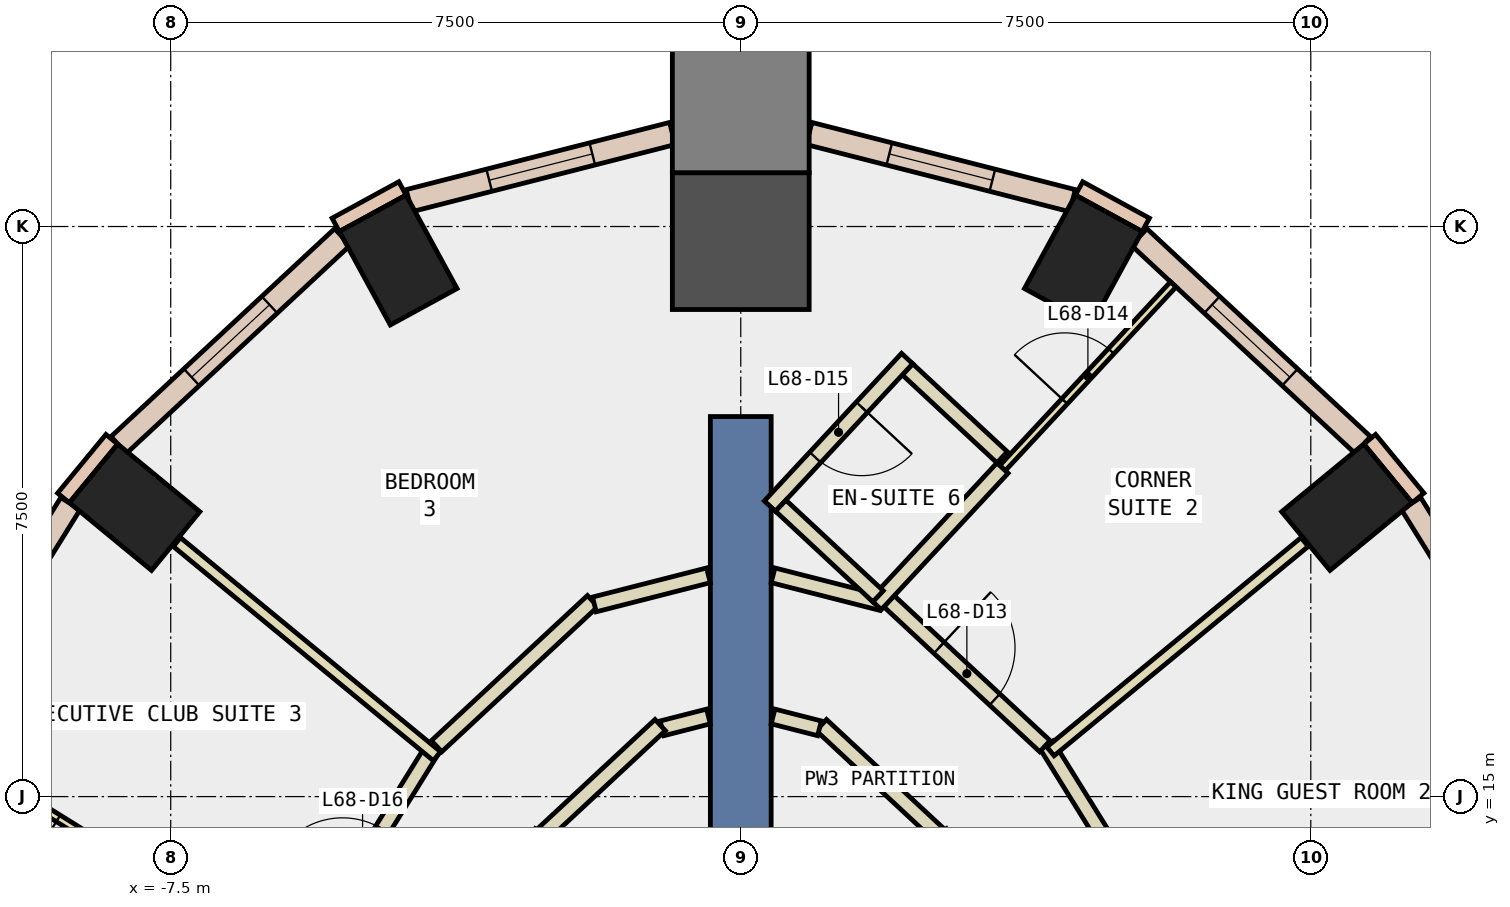
"""IFC4 building model, lengths in metres.
Left out: names, types, materials, properties, quantities, classifications, styles, units other than length and angle.
Written with IfcOpenShell. Run it as: python <this file> out.ifc"""

import sys

from ifc_helpers import new_model, si_unit, direction, frame, frame_2d, origin, origin_2d, place, context, subcontext, project, spatial, rectangle, extrude, element, fill, save


model = new_model("IFC4")
c1 = context("Model", 3, precision=1e-05, world=origin(), true_north=direction((0.0, 1.0)))
c2 = subcontext(c1, "Body", "Model", "MODEL_VIEW")
j1 = project(units=[si_unit("LENGTHUNIT", "METRE"), si_unit("PLANEANGLEUNIT", "RADIAN")], contexts=[c1])
p1 = place(None, origin())
s1 = spatial("IfcSite", under=j1, at=p1, CompositionType="ELEMENT")
p2 = place(p1, origin())
s2 = spatial("IfcBuilding", under=s1, at=p2, CompositionType="ELEMENT")
p3 = place(p2, frame((0.0, 0.0, 293.6)))
s3 = spatial("IfcBuildingStorey", under=s2, at=p3, CompositionType="ELEMENT", Elevation=293.6)
for number, where, z_axis, x_axis in (
    (1, (7.975, 18.807, -0.34), (0.0, 0.0, 1.0), (-0.636, 0.772, 0.0)),
    (2, (4.507, 22.059, -0.34), (0.0, 0.0, 1.0), (-0.878, 0.479, 0.0)),
):
    element("IfcColumn", number, at=place(p3, frame(where, z_axis=z_axis, x_axis=x_axis)), inside=s3, PredefinedType="COLUMN", context=c2, shape_type="SweptSolid", body=[
        extrude(rectangle(XDim=1.0, YDim=1.4, at=origin_2d()), origin(), (0.0, 0.0, 1.0), 3.6),
    ])
p4 = place(p3, frame((0.0, 22.308, -0.34), z_axis=(0.0, 0.0, 1.0), x_axis=(0.0, 1.0, 0.0)))
e3 = element("IfcColumn", 3, at=p4, inside=s3, PredefinedType="COLUMN", context=c2, shape_type="SweptSolid", body=[
    extrude(rectangle(XDim=1.8, YDim=1.8, at=origin_2d()), origin(), (0.0, 0.0, 1.0), 3.6),
])
for number, where, z_axis, x_axis in (
    (4, (-4.507, 22.059, -0.34), (0.0, 0.0, 1.0), (0.878, 0.479, 0.0)),
    (5, (-7.975, 18.807, -0.34), (0.0, 0.0, 1.0), (0.636, 0.772, 0.0)),
):
    element("IfcColumn", number, at=place(p3, frame(where, z_axis=z_axis, x_axis=x_axis)), inside=s3, PredefinedType="COLUMN", context=c2, shape_type="SweptSolid", body=[
        extrude(rectangle(XDim=1.0, YDim=1.4, at=origin_2d()), origin(), (0.0, 0.0, 1.0), 3.6),
    ])
p5 = place(p3, frame((0.0, 24.108, -0.34), z_axis=(0.0, 0.0, 1.0), x_axis=(0.0, 1.0, 0.0)))
e6 = element("IfcColumn", 6, at=p5, inside=s3, PredefinedType="COLUMN", context=c2, shape_type="SweptSolid", body=[
    extrude(rectangle(XDim=1.8, YDim=1.8, at=origin_2d()), origin(), (0.0, 0.0, 1.0), 3.6),
])
p6 = place(p3, frame((0.0, 11.0, -0.34), z_axis=(0.0, 0.0, 1.0), x_axis=(0.0, 1.0, 0.0)))
e7 = element("IfcWall", 7, at=p6, inside=s3, PredefinedType="SHEAR", context=c2, shape_type="SweptSolid", body=[
    extrude(rectangle(XDim=9.0, YDim=0.8, at=frame_2d((4.5, 0.0))), origin(), (0.0, 0.0, 1.0), 3.6),
])
for number, where, z_axis, x_axis in (
    (8, (5.329, 22.522, 0.0), (0.0, 0.0, 1.0), (-0.878, 0.479, 0.0)),
    (9, (-4.451, 23.001, 0.0), (0.0, 0.0, 1.0), (-0.878, -0.479, 0.0)),
    (10, (8.911, 18.929, 0.0), (0.0, 0.0, 1.0), (-0.636, 0.772, 0.0)),
    (11, (-8.275, 19.701, 0.0), (0.0, 0.0, 1.0), (-0.636, -0.772, 0.0)),
):
    element("IfcWall", number, at=place(p3, frame(where, z_axis=z_axis, x_axis=x_axis)), inside=s3, PredefinedType="STANDARD", context=c2, shape_type="SweptSolid", body=[
        extrude(rectangle(XDim=1.0, YDim=0.2, at=frame_2d((0.5, 0.0))), origin(), (0.0, 0.0, 1.0), 3.26),
    ])
p7 = place(p3, frame((12.659, 12.675, 0.0), z_axis=(0.0, 0.0, 1.0), x_axis=(-0.527762071678, 0.849392250788, 0.0)))
e12 = element("IfcWall", 12, at=p7, inside=s3, PredefinedType="STANDARD", context=c2, shape_type="SweptSolid", body=[
    extrude(rectangle(XDim=7.276, YDim=0.3, at=frame_2d((3.638, 0.0))), origin(), (0.0, 0.0, 1.0), 3.26),
])
p8 = place(p7, frame((0.719, 0.0, 0.9)))
e13 = element("IfcOpeningElement", 13, at=p8, cuts=e12, PredefinedType="OPENING", context=c2, shape_type="SweptSolid", body=[
    extrude(rectangle(XDim=2.2, YDim=2.0, at=frame_2d((1.1, 1.0))), frame((0.0, 0.16, 0.0), z_axis=(0.0, -1.0, 0.0), x_axis=(1.0, 0.0, 0.0)), (0.0, 0.0, 1.0), 0.32),
])
p9 = place(p7, frame((4.357, 0.0, 0.9)))
e14 = element("IfcOpeningElement", 14, at=p9, cuts=e12, PredefinedType="OPENING", context=c2, shape_type="SweptSolid", body=[
    extrude(rectangle(XDim=2.2, YDim=2.0, at=frame_2d((1.1, 1.0))), frame((0.0, 0.16, 0.0), z_axis=(0.0, -1.0, 0.0), x_axis=(1.0, 0.0, 0.0)), (0.0, 0.0, 1.0), 0.32),
])
p10 = place(p3, frame((8.184, 19.626, 0.0), z_axis=(0.0, 0.0, 1.0), x_axis=(-0.732397380344, 0.680877431896, 0.0)))
e15 = element("IfcWall", 15, at=p10, inside=s3, PredefinedType="STANDARD", context=c2, shape_type="SweptSolid", body=[
    extrude(rectangle(XDim=4.019, YDim=0.3, at=frame_2d((2.009, 0.0))), origin(), (0.0, 0.0, 1.0), 3.26),
])
p11 = place(p10, frame((1.309, 0.0, 0.9)))
e16 = element("IfcOpeningElement", 16, at=p11, cuts=e15, PredefinedType="OPENING", context=c2, shape_type="SweptSolid", body=[
    extrude(rectangle(XDim=1.4, YDim=2.0, at=frame_2d((0.7, 1.0))), frame((0.0, 0.16, 0.0), z_axis=(0.0, -1.0, 0.0), x_axis=(1.0, 0.0, 0.0)), (0.0, 0.0, 1.0), 0.32),
])
p12 = place(p3, frame((4.365, 22.84, 0.0), z_axis=(0.0, 0.0, 1.0), x_axis=(-0.968979290476, 0.247141932156, 0.0)))
e17 = element("IfcWall", 17, at=p12, inside=s3, PredefinedType="STANDARD", context=c2, shape_type="SweptSolid", body=[
    extrude(rectangle(XDim=3.577, YDim=0.3, at=frame_2d((1.789, 0.0))), origin(), (0.0, 0.0, 1.0), 3.26),
])
p13 = place(p12, frame((1.088, 0.0, 0.9)))
e18 = element("IfcOpeningElement", 18, at=p13, cuts=e17, PredefinedType="OPENING", context=c2, shape_type="SweptSolid", body=[
    extrude(rectangle(XDim=1.4, YDim=2.0, at=frame_2d((0.7, 1.0))), frame((0.0, 0.16, 0.0), z_axis=(0.0, -1.0, 0.0), x_axis=(1.0, 0.0, 0.0)), (0.0, 0.0, 1.0), 0.32),
])
p14 = place(p3, frame((-0.899, 23.724, 0.0), z_axis=(0.0, 0.0, 1.0), x_axis=(-0.968979290476, -0.247141932156, 0.0)))
e19 = element("IfcWall", 19, at=p14, inside=s3, PredefinedType="STANDARD", context=c2, shape_type="SweptSolid", body=[
    extrude(rectangle(XDim=3.577, YDim=0.3, at=frame_2d((1.789, 0.0))), origin(), (0.0, 0.0, 1.0), 3.26),
])
p15 = place(p14, frame((1.088, 0.0, 0.9)))
e20 = element("IfcOpeningElement", 20, at=p15, cuts=e19, PredefinedType="OPENING", context=c2, shape_type="SweptSolid", body=[
    extrude(rectangle(XDim=1.4, YDim=2.0, at=frame_2d((0.7, 1.0))), frame((0.0, 0.16, 0.0), z_axis=(0.0, -1.0, 0.0), x_axis=(1.0, 0.0, 0.0)), (0.0, 0.0, 1.0), 0.32),
])
p16 = place(p3, frame((-5.241, 22.362, 0.0), z_axis=(0.0, 0.0, 1.0), x_axis=(-0.732397380344, -0.680877431896, 0.0)))
e21 = element("IfcWall", 21, at=p16, inside=s3, PredefinedType="STANDARD", context=c2, shape_type="SweptSolid", body=[
    extrude(rectangle(XDim=4.019, YDim=0.3, at=frame_2d((2.009, 0.0))), origin(), (0.0, 0.0, 1.0), 3.26),
])
p17 = place(p16, frame((1.309, 0.0, 0.9)))
e22 = element("IfcOpeningElement", 22, at=p17, cuts=e21, PredefinedType="OPENING", context=c2, shape_type="SweptSolid", body=[
    extrude(rectangle(XDim=1.4, YDim=2.0, at=frame_2d((0.7, 1.0))), frame((0.0, 0.16, 0.0), z_axis=(0.0, -1.0, 0.0), x_axis=(1.0, 0.0, 0.0)), (0.0, 0.0, 1.0), 0.32),
])
p18 = place(p3, frame((-8.819, 18.855, 0.0), z_axis=(0.0, 0.0, 1.0), x_axis=(-0.527762071678, -0.849392250788, 0.0)))
e23 = element("IfcWall", 23, at=p18, inside=s3, PredefinedType="STANDARD", context=c2, shape_type="SweptSolid", body=[
    extrude(rectangle(XDim=7.276, YDim=0.3, at=frame_2d((3.638, 0.0))), origin(), (0.0, 0.0, 1.0), 3.26),
])
p19 = place(p18, frame((0.719, 0.0, 0.9)))
e24 = element("IfcOpeningElement", 24, at=p19, cuts=e23, PredefinedType="OPENING", context=c2, shape_type="SweptSolid", body=[
    extrude(rectangle(XDim=2.2, YDim=2.0, at=frame_2d((1.1, 1.0))), frame((0.0, 0.16, 0.0), z_axis=(0.0, -1.0, 0.0), x_axis=(1.0, 0.0, 0.0)), (0.0, 0.0, 1.0), 0.32),
])
p20 = place(p18, frame((4.357, 0.0, 0.9)))
e25 = element("IfcOpeningElement", 25, at=p20, cuts=e23, PredefinedType="OPENING", context=c2, shape_type="SweptSolid", body=[
    extrude(rectangle(XDim=2.2, YDim=2.0, at=frame_2d((1.1, 1.0))), frame((0.0, 0.16, 0.0), z_axis=(0.0, -1.0, 0.0), x_axis=(1.0, 0.0, 0.0)), (0.0, 0.0, 1.0), 0.32),
])
p21 = place(p3, frame((2.6, 14.509, 0.0), z_axis=(0.0, 0.0, 1.0), x_axis=(-0.732355024595, 0.680922989735, 0.0)))
e26 = element("IfcWall", 26, at=p21, inside=s3, PredefinedType="PARTITIONING", context=c2, shape_type="SweptSolid", body=[
    extrude(rectangle(XDim=2.103, YDim=0.2, at=frame_2d((1.051, 0.0))), origin(), (0.0, 0.0, 1.0), 3.26),
])
for number, where, z_axis, x_axis in (
    (27, (1.036, 15.898, 0.0), (0.0, 0.0, 1.0), (-0.969, 0.247, 0.0)),
    (28, (-0.425, 16.054, 0.0), (0.0, 0.0, 1.0), (-0.969, -0.247, 0.0)),
):
    element("IfcWall", number, at=place(p3, frame(where, z_axis=z_axis, x_axis=x_axis)), inside=s3, PredefinedType="PARTITIONING", context=c2, shape_type="SweptSolid", body=[
        extrude(rectangle(XDim=0.63, YDim=0.2, at=frame_2d((0.315, 0.0))), origin(), (0.0, 0.0, 1.0), 3.26),
    ])
p22 = place(p3, frame((-1.06, 15.941, 0.0), z_axis=(0.0, 0.0, 1.0), x_axis=(-0.732355024595, -0.680922989735, 0.0)))
e29 = element("IfcWall", 29, at=p22, inside=s3, PredefinedType="PARTITIONING", context=c2, shape_type="SweptSolid", body=[
    extrude(rectangle(XDim=2.103, YDim=0.2, at=frame_2d((1.051, 0.0))), origin(), (0.0, 0.0, 1.0), 3.26),
])
p23 = place(p3, frame((4.022, 15.68, 0.0), z_axis=(0.0, 0.0, 1.0), x_axis=(0.527737948498, -0.849407239029, 0.0)))
e30 = element("IfcWall", 30, at=p23, inside=s3, PredefinedType="PARTITIONING", context=c2, shape_type="SweptSolid", body=[
    extrude(rectangle(XDim=5.217, YDim=0.2, at=frame_2d((2.608, 0.0))), origin(), (0.0, 0.0, 1.0), 3.26),
])
p24 = place(p23, frame((2.159, 0.0, 0.0)))
e31 = element("IfcOpeningElement", 31, at=p24, cuts=e30, PredefinedType="OPENING", context=c2, shape_type="SweptSolid", body=[
    extrude(rectangle(XDim=1.0, YDim=2.1, at=frame_2d((0.5, 1.05))), frame((0.0, 0.11, 0.0), z_axis=(0.0, -1.0, 0.0), x_axis=(1.0, 0.0, 0.0)), (0.0, 0.0, 1.0), 0.22),
])
p25 = place(p3, frame((1.949, 17.572, 0.0), z_axis=(0.0, 0.0, 1.0), x_axis=(0.732331154554, -0.680948661846, 0.0)))
e32 = element("IfcWall", 32, at=p25, inside=s3, PredefinedType="PARTITIONING", context=c2, shape_type="SweptSolid", body=[
    extrude(rectangle(XDim=2.803, YDim=0.2, at=frame_2d((1.402, 0.0))), origin(), (0.0, 0.0, 1.0), 3.26),
])
p26 = place(p25, frame((0.901, 0.0, 0.0)))
e33 = element("IfcOpeningElement", 33, at=p26, cuts=e32, PredefinedType="OPENING", context=c2, shape_type="SweptSolid", body=[
    extrude(rectangle(XDim=1.0, YDim=2.1, at=frame_2d((0.5, 1.05))), frame((0.0, 0.11, 0.0), z_axis=(0.0, -1.0, 0.0), x_axis=(1.0, 0.0, 0.0)), (0.0, 0.0, 1.0), 0.22),
])
p27 = place(p3, frame((-4.002, 15.663, 0.0), z_axis=(0.0, 0.0, 1.0), x_axis=(0.732331154554, 0.680948661846, 0.0)))
e34 = element("IfcWall", 34, at=p27, inside=s3, PredefinedType="PARTITIONING", context=c2, shape_type="SweptSolid", body=[
    extrude(rectangle(XDim=2.803, YDim=0.2, at=frame_2d((1.402, 0.0))), origin(), (0.0, 0.0, 1.0), 3.26),
])
p28 = place(p3, frame((-1.926, 17.528, 0.0), z_axis=(0.0, 0.0, 1.0), x_axis=(0.968981980879, 0.247131383542, 0.0)))
e35 = element("IfcWall", 35, at=p28, inside=s3, PredefinedType="PARTITIONING", context=c2, shape_type="SweptSolid", body=[
    extrude(rectangle(XDim=1.549, YDim=0.2, at=frame_2d((0.774, 0.0))), origin(), (0.0, 0.0, 1.0), 3.26),
])
p29 = place(p3, frame((0.425, 17.911, 0.0), z_axis=(0.0, 0.0, 1.0), x_axis=(0.969051069597, -0.246860334023, 0.0)))
e36 = element("IfcWall", 36, at=p29, inside=s3, PredefinedType="PARTITIONING", context=c2, shape_type="SweptSolid", body=[
    extrude(rectangle(XDim=1.474, YDim=0.2, at=frame_2d((0.737, 0.0))), origin(), (0.0, 0.0, 1.0), 3.26),
])
p30 = place(p3, frame((-5.889, 12.675, 0.0), z_axis=(0.0, 0.0, 1.0), x_axis=(0.527550626699, 0.849523593709, 0.0)))
e37 = element("IfcWall", 37, at=p30, inside=s3, PredefinedType="PARTITIONING", context=c2, shape_type="SweptSolid", body=[
    extrude(rectangle(XDim=3.463, YDim=0.2, at=frame_2d((1.731, 0.0))), origin(), (0.0, 0.0, 1.0), 3.26),
])
p31 = place(p30, frame((1.231, 0.0, 0.0)))
e38 = element("IfcOpeningElement", 38, at=p31, cuts=e37, PredefinedType="OPENING", context=c2, shape_type="SweptSolid", body=[
    extrude(rectangle(XDim=1.0, YDim=2.1, at=frame_2d((0.5, 1.05))), frame((0.0, 0.11, 0.0), z_axis=(0.0, -1.0, 0.0), x_axis=(1.0, 0.0, 0.0)), (0.0, 0.0, 1.0), 0.22),
])
p32 = place(p3, frame((4.075, 15.595, 0.0), z_axis=(0.0, 0.0, 1.0), x_axis=(0.771899326406, 0.635744783616, 0.0)))
e39 = element("IfcWall", 39, at=p32, inside=s3, PredefinedType="PARTITIONING", context=c2, shape_type="SweptSolid", body=[
    extrude(rectangle(XDim=4.332, YDim=0.15, at=frame_2d((2.166, 0.0))), origin(), (0.0, 0.0, 1.0), 3.26),
])
p33 = place(p3, frame((3.444, 19.322, 0.0), z_axis=(0.0, 0.0, 1.0), x_axis=(0.68085394361, 0.732419215662, 0.0)))
e40 = element("IfcWall", 40, at=p33, inside=s3, PredefinedType="PARTITIONING", context=c2, shape_type="SweptSolid", body=[
    extrude(rectangle(XDim=3.3, YDim=0.1, at=frame_2d((1.65, 0.0))), origin(), (0.0, 0.0, 1.0), 3.26),
])
p34 = place(p33, frame((1.2, 0.0, 0.0)))
e41 = element("IfcOpeningElement", 41, at=p34, cuts=e40, PredefinedType="OPENING", context=c2, shape_type="SweptSolid", body=[
    extrude(rectangle(XDim=0.9, YDim=2.1, at=frame_2d((0.45, 1.05))), frame((0.0, 0.06, 0.0), z_axis=(0.0, -1.0, 0.0), x_axis=(1.0, 0.0, 0.0)), (0.0, 0.0, 1.0), 0.12),
])
p35 = place(p3, frame((1.776, 17.528, 0.0), z_axis=(0.0, 0.0, 1.0), x_axis=(0.680978439741, 0.732303464834, 0.0)))
e42 = element("IfcWall", 42, at=p35, inside=s3, PredefinedType="PARTITIONING", context=c2, shape_type="SweptSolid", body=[
    extrude(rectangle(XDim=2.45, YDim=0.2, at=frame_2d((1.225, 0.0))), origin(), (0.0, 0.0, 1.0), 3.26),
])
p36 = place(p3, frame((3.439, 19.464, 0.0), z_axis=(0.0, 0.0, 1.0), x_axis=(-0.732491549411, 0.68077612329, 0.0)))
e43 = element("IfcWall", 43, at=p36, inside=s3, PredefinedType="PARTITIONING", context=c2, shape_type="SweptSolid", body=[
    extrude(rectangle(XDim=1.699, YDim=0.2, at=frame_2d((0.85, 0.0))), origin(), (0.0, 0.0, 1.0), 3.26),
])
p37 = place(p3, frame((2.189, 20.763, 0.0), z_axis=(0.0, 0.0, 1.0), x_axis=(-0.680987945319, -0.73229462536, 0.0)))
e44 = element("IfcWall", 44, at=p37, inside=s3, PredefinedType="PARTITIONING", context=c2, shape_type="SweptSolid", body=[
    extrude(rectangle(XDim=2.65, YDim=0.2, at=frame_2d((1.325, 0.0))), origin(), (0.0, 0.0, 1.0), 3.26),
])
p38 = place(p37, frame((0.875, 0.0, 0.0)))
e45 = element("IfcOpeningElement", 45, at=p38, cuts=e44, PredefinedType="OPENING", context=c2, shape_type="SweptSolid", body=[
    extrude(rectangle(XDim=0.9, YDim=2.1, at=frame_2d((0.45, 1.05))), frame((0.0, 0.11, 0.0), z_axis=(0.0, -1.0, 0.0), x_axis=(1.0, 0.0, 0.0)), (0.0, 0.0, 1.0), 0.22),
])
p39 = place(p3, frame((0.526, 18.827, 0.0), z_axis=(0.0, 0.0, 1.0), x_axis=(0.732112296378, -0.681183958628, 0.0)))
e46 = element("IfcWall", 46, at=p39, inside=s3, PredefinedType="PARTITIONING", context=c2, shape_type="SweptSolid", body=[
    extrude(rectangle(XDim=1.75, YDim=0.2, at=frame_2d((0.875, 0.0))), origin(), (0.0, 0.0, 1.0), 3.26),
])
p40 = place(p3, frame((-3.998, 15.532, 0.0), z_axis=(0.0, 0.0, 1.0), x_axis=(-0.771938186867, 0.635697597649, 0.0)))
e47 = element("IfcWall", 47, at=p40, inside=s3, PredefinedType="PARTITIONING", context=c2, shape_type="SweptSolid", body=[
    extrude(rectangle(XDim=4.432, YDim=0.15, at=frame_2d((2.216, 0.0))), origin(), (0.0, 0.0, 1.0), 3.26),
])
p41 = place(p3, frame((-8.13, 14.185, 0.0), z_axis=(0.0, 0.0, 1.0), x_axis=(-0.849305726881, 0.527901299759, 0.0)))
e48 = element("IfcWall", 48, at=p41, inside=s3, PredefinedType="PARTITIONING", context=c2, shape_type="SweptSolid", body=[
    extrude(rectangle(XDim=2.9, YDim=0.1, at=frame_2d((1.45, 0.0))), origin(), (0.0, 0.0, 1.0), 3.26),
])
p42 = place(p41, frame((1.0, 0.0, 0.0)))
e49 = element("IfcOpeningElement", 49, at=p42, cuts=e48, PredefinedType="OPENING", context=c2, shape_type="SweptSolid", body=[
    extrude(rectangle(XDim=0.9, YDim=2.1, at=frame_2d((0.45, 1.05))), frame((0.0, 0.06, 0.0), z_axis=(0.0, -1.0, 0.0), x_axis=(1.0, 0.0, 0.0)), (0.0, 0.0, 1.0), 0.12),
])
p43 = place(p11, origin())
e50 = element("IfcWindow", 50, at=p43, inside=s3, PartitioningType="SINGLE_PANEL", PredefinedType="WINDOW", context=c2, shape_type="SweptSolid", body=[
    extrude(rectangle(XDim=1.4, YDim=2.0, at=frame_2d((0.7, 1.0))), frame((0.0, 0.03, 0.0), z_axis=(0.0, -1.0, 0.0), x_axis=(1.0, 0.0, 0.0)), (0.0, 0.0, 1.0), 0.06),
])
fill(e16, e50)
p44 = place(p13, origin())
e51 = element("IfcWindow", 51, at=p44, inside=s3, PartitioningType="SINGLE_PANEL", PredefinedType="WINDOW", context=c2, shape_type="SweptSolid", body=[
    extrude(rectangle(XDim=1.4, YDim=2.0, at=frame_2d((0.7, 1.0))), frame((0.0, 0.03, 0.0), z_axis=(0.0, -1.0, 0.0), x_axis=(1.0, 0.0, 0.0)), (0.0, 0.0, 1.0), 0.06),
])
fill(e18, e51)
p45 = place(p15, origin())
e52 = element("IfcWindow", 52, at=p45, inside=s3, PartitioningType="SINGLE_PANEL", PredefinedType="WINDOW", context=c2, shape_type="SweptSolid", body=[
    extrude(rectangle(XDim=1.4, YDim=2.0, at=frame_2d((0.7, 1.0))), frame((0.0, 0.03, 0.0), z_axis=(0.0, -1.0, 0.0), x_axis=(1.0, 0.0, 0.0)), (0.0, 0.0, 1.0), 0.06),
])
fill(e20, e52)
p46 = place(p17, origin())
e53 = element("IfcWindow", 53, at=p46, inside=s3, PartitioningType="SINGLE_PANEL", PredefinedType="WINDOW", context=c2, shape_type="SweptSolid", body=[
    extrude(rectangle(XDim=1.4, YDim=2.0, at=frame_2d((0.7, 1.0))), frame((0.0, 0.03, 0.0), z_axis=(0.0, -1.0, 0.0), x_axis=(1.0, 0.0, 0.0)), (0.0, 0.0, 1.0), 0.06),
])
fill(e22, e53)
p47 = place(p26, origin())
e54 = element("IfcDoor", 54, at=p47, inside=s3, OperationType="SINGLE_SWING_LEFT", PredefinedType="DOOR", context=c2, shape_type="SweptSolid", body=[
    extrude(rectangle(XDim=1.0, YDim=2.1, at=frame_2d((0.5, 1.05))), frame((0.0, 0.025, 0.0), z_axis=(0.0, -1.0, 0.0), x_axis=(1.0, 0.0, 0.0)), (0.0, 0.0, 1.0), 0.05),
])
fill(e33, e54)
p48 = place(p34, origin())
e55 = element("IfcDoor", 55, at=p48, inside=s3, OperationType="SINGLE_SWING_LEFT", PredefinedType="DOOR", context=c2, shape_type="SweptSolid", body=[
    extrude(rectangle(XDim=0.9, YDim=2.1, at=frame_2d((0.45, 1.05))), frame((0.0, 0.025, 0.0), z_axis=(0.0, -1.0, 0.0), x_axis=(1.0, 0.0, 0.0)), (0.0, 0.0, 1.0), 0.05),
])
fill(e41, e55)
p49 = place(p38, origin())
e56 = element("IfcDoor", 56, at=p49, inside=s3, OperationType="SINGLE_SWING_LEFT", PredefinedType="DOOR", context=c2, shape_type="SweptSolid", body=[
    extrude(rectangle(XDim=0.9, YDim=2.1, at=frame_2d((0.45, 1.05))), frame((0.0, 0.025, 0.0), z_axis=(0.0, -1.0, 0.0), x_axis=(1.0, 0.0, 0.0)), (0.0, 0.0, 1.0), 0.05),
])
fill(e45, e56)
p50 = place(p42, origin())
e57 = element("IfcDoor", 57, at=p50, inside=s3, OperationType="SINGLE_SWING_LEFT", PredefinedType="DOOR", context=c2, shape_type="SweptSolid", body=[
    extrude(rectangle(XDim=0.9, YDim=2.1, at=frame_2d((0.45, 1.05))), frame((0.0, 0.025, 0.0), z_axis=(0.0, -1.0, 0.0), x_axis=(1.0, 0.0, 0.0)), (0.0, 0.0, 1.0), 0.05),
])
fill(e49, e57)
save(model, sys.argv[1])
